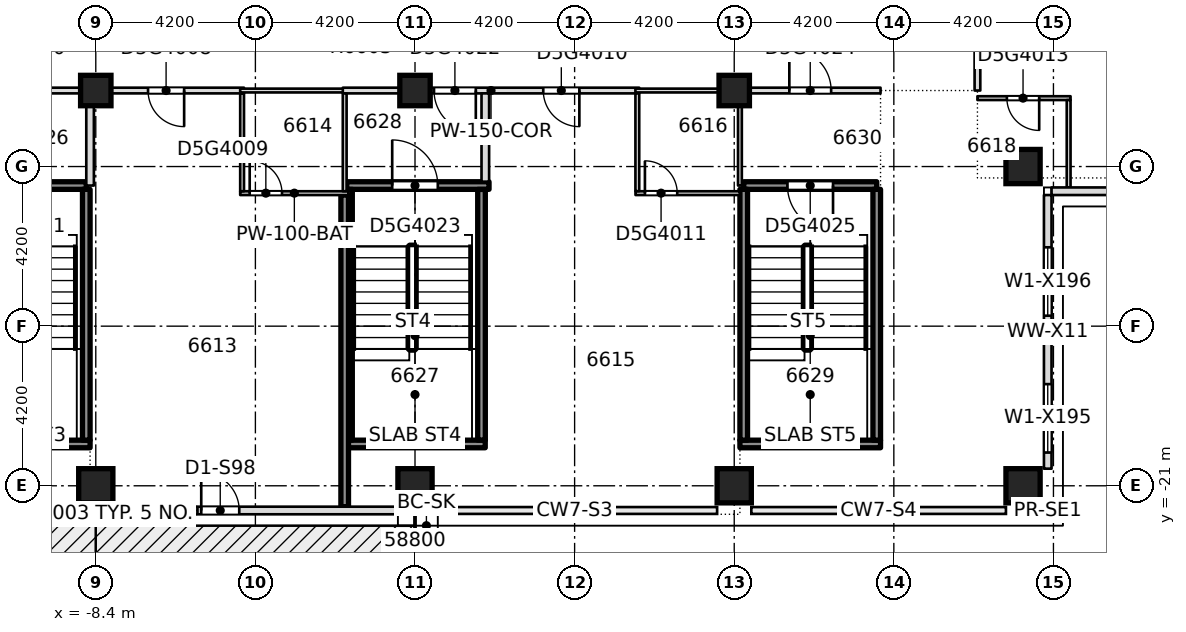
"""IFC4 building model, lengths in metres.
Left out: names, types, materials, properties, quantities, classifications, styles, units other than length and angle.
Written with IfcOpenShell. Run it as: python <this file> out.ifc"""

import sys

from ifc_helpers import new_model, si_unit, direction, frame, frame_2d, origin, origin_2d, place, context, subcontext, project, spatial, rectangle, extrude, element, fill, save


model = new_model("IFC4")
c1 = context("Model", 3, precision=1e-05, world=origin(), true_north=direction((0.0, 1.0)))
c2 = subcontext(c1, "Body", "Model", "MODEL_VIEW")
j1 = project(units=[si_unit("LENGTHUNIT", "METRE"), si_unit("PLANEANGLEUNIT", "RADIAN")], contexts=[c1])
p1 = place(None, origin())
s1 = spatial("IfcSite", under=j1, at=p1, CompositionType="ELEMENT")
p2 = place(p1, origin())
s2 = spatial("IfcBuilding", under=s1, at=p2, CompositionType="ELEMENT")
p3 = place(p2, frame((0.0, 0.0, 251.05)))
s3 = spatial("IfcBuildingStorey", under=s2, at=p3, CompositionType="ELEMENT", Elevation=251.05)
for number, where, z_axis, x_axis in (
    (1, (-8.4, -21.0, -0.4), (0.0, 0.0, 1.0), (1.0, 0.0, 0.0)),
    (2, (0.0, -21.0, -0.4), (0.0, 0.0, 1.0), (1.0, 0.0, 0.0)),
    (3, (8.4, -21.0, -0.4), (0.0, 0.0, 1.0), (1.0, 0.0, 0.0)),
    (4, (16.0, -21.0, -0.4), (0.0, 0.0, 1.0), (1.0, 0.0, 0.0)),
    (5, (16.0, -12.6, -0.4), (0.0, 0.0, 1.0), (1.0, 0.0, 0.0)),
):
    element("IfcColumn", number, at=place(p3, frame(where, z_axis=z_axis, x_axis=x_axis)), inside=s3, PredefinedType="COLUMN", context=c2, shape_type="SweptSolid", body=[
        extrude(rectangle(XDim=0.9, YDim=0.9, at=origin_2d()), origin(), (0.0, 0.0, 1.0), 3.45),
    ])
for number, where, z_axis, x_axis in (
    (6, (-8.4, -10.6, -0.4), (0.0, 0.0, 1.0), (1.0, 0.0, 0.0)),
    (7, (0.0, -10.6, -0.4), (0.0, 0.0, 1.0), (1.0, 0.0, 0.0)),
    (8, (8.4, -10.6, -0.4), (0.0, 0.0, 1.0), (1.0, 0.0, 0.0)),
):
    element("IfcColumn", number, at=place(p3, frame(where, z_axis=z_axis, x_axis=x_axis)), inside=s3, PredefinedType="COLUMN", context=c2, shape_type="SweptSolid", body=[
        extrude(rectangle(XDim=0.8, YDim=0.8, at=origin_2d()), origin(), (0.0, 0.0, 1.0), 3.45),
    ])
p4 = place(p3, frame((-1.848, -19.9, 0.0), z_axis=(0.0, 0.0, 1.0), x_axis=(1.0, 0.0, 0.0)))
e9 = element("IfcWall", 9, at=p4, inside=s3, PredefinedType="SOLIDWALL", context=c2, shape_type="SweptSolid", body=[
    extrude(rectangle(XDim=3.696, YDim=0.2, at=frame_2d((1.848, 0.0))), origin(), (0.0, 0.0, 1.0), 3.05),
])
p5 = place(p3, frame((-4.6, -13.3, 0.0), z_axis=(0.0, 0.0, 1.0), x_axis=(1.0, 0.0, 0.0)))
e10 = element("IfcWall", 10, at=p5, inside=s3, PredefinedType="PARTITIONING", context=c2, shape_type="SweptSolid", body=[
    extrude(rectangle(XDim=2.85, YDim=0.1, at=frame_2d((1.425, 0.0))), origin(), (0.0, 0.0, 1.0), 3.05),
])
p6 = place(p5, frame((0.25, 0.0, 0.0)))
e11 = element("IfcOpeningElement", 11, at=p6, cuts=e10, PredefinedType="OPENING", context=c2, shape_type="SweptSolid", body=[
    extrude(rectangle(XDim=0.85, YDim=2.1, at=frame_2d((0.425, 1.05))), frame((0.0, 0.06, 0.0), z_axis=(0.0, -1.0, 0.0), x_axis=(1.0, 0.0, 0.0)), (0.0, 0.0, 1.0), 0.12),
])
p7 = place(p3, frame((5.802, -13.3, 0.0), z_axis=(0.0, 0.0, 1.0), x_axis=(1.0, 0.0, 0.0)))
e12 = element("IfcWall", 12, at=p7, inside=s3, PredefinedType="PARTITIONING", context=c2, shape_type="SweptSolid", body=[
    extrude(rectangle(XDim=2.748, YDim=0.1, at=frame_2d((1.374, 0.0))), origin(), (0.0, 0.0, 1.0), 3.05),
])
p8 = place(p7, frame((0.248, 0.0, 0.0)))
e13 = element("IfcOpeningElement", 13, at=p8, cuts=e12, PredefinedType="OPENING", context=c2, shape_type="SweptSolid", body=[
    extrude(rectangle(XDim=0.85, YDim=2.1, at=frame_2d((0.425, 1.05))), frame((0.0, 0.06, 0.0), z_axis=(0.0, -1.0, 0.0), x_axis=(1.0, 0.0, 0.0)), (0.0, 0.0, 1.0), 0.12),
])
p9 = place(p3, frame((-12.15, -13.1, 0.0), z_axis=(0.0, 0.0, 1.0), x_axis=(1.0, 0.0, 0.0)))
e14 = element("IfcWall", 14, at=p9, inside=s3, PredefinedType="SOLIDWALL", context=c2, shape_type="SweptSolid", body=[
    extrude(rectangle(XDim=3.5, YDim=0.2, at=frame_2d((1.75, 0.0))), origin(), (0.0, 0.0, 1.0), 3.05),
])
p10 = place(p9, frame((1.15, 0.0, 0.0)))
e15 = element("IfcOpeningElement", 15, at=p10, cuts=e14, PredefinedType="OPENING", context=c2, shape_type="SweptSolid", body=[
    extrude(rectangle(XDim=1.2, YDim=2.1, at=frame_2d((0.6, 1.05))), frame((0.0, 0.11, 0.0), z_axis=(0.0, -1.0, 0.0), x_axis=(1.0, 0.0, 0.0)), (0.0, 0.0, 1.0), 0.22),
])
p11 = place(p3, frame((-1.798, -13.1, 0.0), z_axis=(0.0, 0.0, 1.0), x_axis=(1.0, 0.0, 0.0)))
e16 = element("IfcWall", 16, at=p11, inside=s3, PredefinedType="SOLIDWALL", context=c2, shape_type="SweptSolid", body=[
    extrude(rectangle(XDim=3.746, YDim=0.2, at=frame_2d((1.873, 0.0))), origin(), (0.0, 0.0, 1.0), 3.05),
])
p12 = place(p11, frame((1.198, 0.0, 0.0)))
e17 = element("IfcOpeningElement", 17, at=p12, cuts=e16, PredefinedType="OPENING", context=c2, shape_type="SweptSolid", body=[
    extrude(rectangle(XDim=1.2, YDim=2.1, at=frame_2d((0.6, 1.05))), frame((0.0, 0.11, 0.0), z_axis=(0.0, -1.0, 0.0), x_axis=(1.0, 0.0, 0.0)), (0.0, 0.0, 1.0), 0.22),
])
p13 = place(p3, frame((8.65, -13.1, 0.0), z_axis=(0.0, 0.0, 1.0), x_axis=(1.0, 0.0, 0.0)))
e18 = element("IfcWall", 18, at=p13, inside=s3, PredefinedType="SOLIDWALL", context=c2, shape_type="SweptSolid", body=[
    extrude(rectangle(XDim=3.5, YDim=0.2, at=frame_2d((1.75, 0.0))), origin(), (0.0, 0.0, 1.0), 3.05),
])
p14 = place(p13, frame((1.15, 0.0, 0.0)))
e19 = element("IfcOpeningElement", 19, at=p14, cuts=e18, PredefinedType="OPENING", context=c2, shape_type="SweptSolid", body=[
    extrude(rectangle(XDim=1.2, YDim=2.1, at=frame_2d((0.6, 1.05))), frame((0.0, 0.11, 0.0), z_axis=(0.0, -1.0, 0.0), x_axis=(1.0, 0.0, 0.0)), (0.0, 0.0, 1.0), 0.22),
])
p15 = place(p3, frame((14.8, -10.8, 0.0), z_axis=(0.0, 0.0, 1.0), x_axis=(1.0, 0.0, 0.0)))
e20 = element("IfcWall", 20, at=p15, inside=s3, PredefinedType="PARTITIONING", context=c2, shape_type="SweptSolid", body=[
    extrude(rectangle(XDim=2.45, YDim=0.1, at=frame_2d((1.225, 0.0))), origin(), (0.0, 0.0, 1.0), 3.05),
])
p16 = place(p15, frame((0.775, 0.0, 0.0)))
e21 = element("IfcOpeningElement", 21, at=p16, cuts=e20, PredefinedType="OPENING", context=c2, shape_type="SweptSolid", body=[
    extrude(rectangle(XDim=0.85, YDim=2.1, at=frame_2d((0.425, 1.05))), frame((0.0, 0.06, 0.0), z_axis=(0.0, -1.0, 0.0), x_axis=(1.0, 0.0, 0.0)), (0.0, 0.0, 1.0), 0.12),
])
p17 = place(p3, frame((-12.25, -10.6, 0.0), z_axis=(0.0, 0.0, 1.0), x_axis=(1.0, 0.0, 0.0)))
e22 = element("IfcWall", 22, at=p17, inside=s3, PredefinedType="PARTITIONING", context=c2, shape_type="SweptSolid", body=[
    extrude(rectangle(XDim=7.75, YDim=0.15, at=frame_2d((3.875, 0.0))), origin(), (0.0, 0.0, 1.0), 3.05),
])
p18 = place(p17, frame((5.225, 0.0, 0.0)))
e23 = element("IfcOpeningElement", 23, at=p18, cuts=e22, PredefinedType="OPENING", context=c2, shape_type="SweptSolid", body=[
    extrude(rectangle(XDim=0.95, YDim=2.1, at=frame_2d((0.475, 1.05))), frame((0.0, 0.085, 0.0), z_axis=(0.0, -1.0, 0.0), x_axis=(1.0, 0.0, 0.0)), (0.0, 0.0, 1.0), 0.17),
])
p19 = place(p17, frame((1.3, 0.0, 0.0)))
e24 = element("IfcOpeningElement", 24, at=p19, cuts=e22, PredefinedType="OPENING", context=c2, shape_type="SweptSolid", body=[
    extrude(rectangle(XDim=1.1, YDim=2.1, at=frame_2d((0.55, 1.05))), frame((0.0, 0.085, 0.0), z_axis=(0.0, -1.0, 0.0), x_axis=(1.0, 0.0, 0.0)), (0.0, 0.0, 1.0), 0.17),
])
p20 = place(p3, frame((-4.6, -10.6, 0.0), z_axis=(0.0, 0.0, 1.0), x_axis=(1.0, 0.0, 0.0)))
e25 = element("IfcWall", 25, at=p20, inside=s3, PredefinedType="PARTITIONING", context=c2, shape_type="SweptSolid", body=[
    extrude(rectangle(XDim=2.8, YDim=0.1, at=frame_2d((1.4, 0.0))), origin(), (0.0, 0.0, 1.0), 3.05),
])
p21 = place(p3, frame((-1.9, -10.6, 0.0), z_axis=(0.0, 0.0, 1.0), x_axis=(1.0, 0.0, 0.0)))
e26 = element("IfcWall", 26, at=p21, inside=s3, PredefinedType="PARTITIONING", context=c2, shape_type="SweptSolid", body=[
    extrude(rectangle(XDim=7.8, YDim=0.15, at=frame_2d((3.9, 0.0))), origin(), (0.0, 0.0, 1.0), 3.05),
])
p22 = place(p21, frame((5.275, 0.0, 0.0)))
e27 = element("IfcOpeningElement", 27, at=p22, cuts=e26, PredefinedType="OPENING", context=c2, shape_type="SweptSolid", body=[
    extrude(rectangle(XDim=0.95, YDim=2.1, at=frame_2d((0.475, 1.05))), frame((0.0, 0.085, 0.0), z_axis=(0.0, -1.0, 0.0), x_axis=(1.0, 0.0, 0.0)), (0.0, 0.0, 1.0), 0.17),
])
p23 = place(p21, frame((2.4, 0.0, 0.0)))
e28 = element("IfcOpeningElement", 28, at=p23, cuts=e26, PredefinedType="OPENING", context=c2, shape_type="SweptSolid", body=[
    extrude(rectangle(XDim=1.1, YDim=2.1, at=frame_2d((0.55, 1.05))), frame((0.0, 0.085, 0.0), z_axis=(0.0, -1.0, 0.0), x_axis=(1.0, 0.0, 0.0)), (0.0, 0.0, 1.0), 0.17),
])
p24 = place(p3, frame((5.8, -10.6, 0.0), z_axis=(0.0, 0.0, 1.0), x_axis=(1.0, 0.0, 0.0)))
e29 = element("IfcWall", 29, at=p24, inside=s3, PredefinedType="PARTITIONING", context=c2, shape_type="SweptSolid", body=[
    extrude(rectangle(XDim=2.8, YDim=0.1, at=frame_2d((1.4, 0.0))), origin(), (0.0, 0.0, 1.0), 3.05),
])
p25 = place(p3, frame((8.5, -10.6, 0.0), z_axis=(0.0, 0.0, 1.0), x_axis=(1.0, 0.0, 0.0)))
e30 = element("IfcWall", 30, at=p25, inside=s3, PredefinedType="PARTITIONING", context=c2, shape_type="SweptSolid", body=[
    extrude(rectangle(XDim=3.75, YDim=0.15, at=frame_2d((1.875, 0.0))), origin(), (0.0, 0.0, 1.0), 3.05),
])
p26 = place(p25, frame((1.35, 0.0, 0.0)))
e31 = element("IfcOpeningElement", 31, at=p26, cuts=e30, PredefinedType="OPENING", context=c2, shape_type="SweptSolid", body=[
    extrude(rectangle(XDim=1.1, YDim=2.1, at=frame_2d((0.55, 1.05))), frame((0.0, 0.085, 0.0), z_axis=(0.0, -1.0, 0.0), x_axis=(1.0, 0.0, 0.0)), (0.0, 0.0, 1.0), 0.17),
])
p27 = place(p3, frame((-8.55, -13.1, 0.0), z_axis=(0.0, 0.0, 1.0), x_axis=(0.0, 1.0, 0.0)))
e32 = element("IfcWall", 32, at=p27, inside=s3, PredefinedType="PARTITIONING", context=c2, shape_type="SweptSolid", body=[
    extrude(rectangle(XDim=2.425, YDim=0.2, at=frame_2d((1.212, 0.0))), origin(), (0.0, 0.0, 1.0), 3.05),
])
for number, where, z_axis, x_axis in (
    (33, (-4.55, -13.25, 0.0), (0.0, 0.0, 1.0), (0.0, 1.0, 0.0)),
    (34, (-1.85, -13.25, 0.0), (0.0, 0.0, 1.0), (0.0, 1.0, 0.0)),
):
    element("IfcWall", number, at=place(p3, frame(where, z_axis=z_axis, x_axis=x_axis)), inside=s3, PredefinedType="PARTITIONING", context=c2, shape_type="SweptSolid", body=[
        extrude(rectangle(XDim=2.575, YDim=0.1, at=frame_2d((1.288, 0.0))), origin(), (0.0, 0.0, 1.0), 3.05),
    ])
for number, where, z_axis, x_axis in (
    (35, (-1.75, -19.798, 0.0), (0.0, 0.0, 1.0), (0.0, 1.0, 0.0)),
    (36, (1.75, -19.798, 0.0), (0.0, 0.0, 1.0), (0.0, 1.0, 0.0)),
):
    element("IfcWall", number, at=place(p3, frame(where, z_axis=z_axis, x_axis=x_axis)), inside=s3, PredefinedType="SOLIDWALL", context=c2, shape_type="SweptSolid", body=[
        extrude(rectangle(XDim=6.596, YDim=0.2, at=frame_2d((3.298, 0.0))), origin(), (0.0, 0.0, 1.0), 3.05),
    ])
p28 = place(p3, frame((1.85, -12.998, 0.0), z_axis=(0.0, 0.0, 1.0), x_axis=(0.0, 1.0, 0.0)))
e37 = element("IfcWall", 37, at=p28, inside=s3, PredefinedType="PARTITIONING", context=c2, shape_type="SweptSolid", body=[
    extrude(rectangle(XDim=2.323, YDim=0.2, at=frame_2d((1.162, 0.0))), origin(), (0.0, 0.0, 1.0), 3.05),
])
p29 = place(p3, frame((5.85, -13.248, 0.0), z_axis=(0.0, 0.0, 1.0), x_axis=(0.0, 1.0, 0.0)))
e38 = element("IfcWall", 38, at=p29, inside=s3, PredefinedType="PARTITIONING", context=c2, shape_type="SweptSolid", body=[
    extrude(rectangle(XDim=2.573, YDim=0.1, at=frame_2d((1.287, 0.0))), origin(), (0.0, 0.0, 1.0), 3.05),
])
p30 = place(p3, frame((8.55, -13.1, 0.0), z_axis=(0.0, 0.0, 1.0), x_axis=(0.0, 1.0, 0.0)))
e39 = element("IfcWall", 39, at=p30, inside=s3, PredefinedType="PARTITIONING", context=c2, shape_type="SweptSolid", body=[
    extrude(rectangle(XDim=2.425, YDim=0.1, at=frame_2d((1.212, 0.0))), origin(), (0.0, 0.0, 1.0), 3.05),
])
p31 = place(p3, frame((14.8, -10.6, 0.0), z_axis=(0.0, 0.0, 1.0), x_axis=(0.0, 1.0, 0.0)))
e40 = element("IfcWall", 40, at=p31, inside=s3, PredefinedType="PARTITIONING", context=c2, shape_type="SweptSolid", body=[
    extrude(rectangle(XDim=3.125, YDim=0.15, at=frame_2d((1.562, 0.0))), origin(), (0.0, 0.0, 1.0), 3.05),
])
p32 = place(p3, frame((17.2, -13.15, 0.0), z_axis=(0.0, 0.0, 1.0), x_axis=(0.0, 1.0, 0.0)))
e41 = element("IfcWall", 41, at=p32, inside=s3, PredefinedType="PARTITIONING", context=c2, shape_type="SweptSolid", body=[
    extrude(rectangle(XDim=2.3, YDim=0.1, at=frame_2d((1.15, 0.0))), origin(), (0.0, 0.0, 1.0), 3.05),
])
p33 = place(p3, frame((-15.55, -21.65, 0.0), z_axis=(0.0, 0.0, 1.0), x_axis=(1.0, 0.0, 0.0)))
e42 = element("IfcWall", 42, at=p33, inside=s3, PredefinedType="STANDARD", context=c2, shape_type="SweptSolid", body=[
    extrude(rectangle(XDim=6.7, YDim=0.2, at=frame_2d((3.35, 0.0))), origin(), (0.0, 0.0, 1.0), 3.05),
])
p34 = place(p33, frame((0.975, 0.0, 0.0)))
e43 = element("IfcOpeningElement", 43, at=p34, cuts=e42, PredefinedType="OPENING", context=c2, shape_type="SweptSolid", body=[
    extrude(rectangle(XDim=1.0, YDim=2.4, at=frame_2d((0.5, 1.2))), frame((0.0, 0.11, 0.0), z_axis=(0.0, -1.0, 0.0), x_axis=(1.0, 0.0, 0.0)), (0.0, 0.0, 1.0), 0.22),
])
p35 = place(p3, frame((-7.95, -21.65, 0.0), z_axis=(0.0, 0.0, 1.0), x_axis=(1.0, 0.0, 0.0)))
e44 = element("IfcWall", 44, at=p35, inside=s3, PredefinedType="STANDARD", context=c2, shape_type="SweptSolid", body=[
    extrude(rectangle(XDim=7.5, YDim=0.2, at=frame_2d((3.75, 0.0))), origin(), (0.0, 0.0, 1.0), 3.05),
])
p36 = place(p35, frame((0.425, 0.0, 0.2)))
e45 = element("IfcOpeningElement", 45, at=p36, cuts=e44, PredefinedType="OPENING", context=c2, shape_type="SweptSolid", body=[
    extrude(rectangle(XDim=1.8, YDim=2.65, at=frame_2d((0.9, 1.325))), frame((0.0, 0.11, 0.0), z_axis=(0.0, -1.0, 0.0), x_axis=(1.0, 0.0, 0.0)), (0.0, 0.0, 1.0), 0.22),
])
p37 = place(p35, frame((2.325, 0.0, 0.0)))
e46 = element("IfcOpeningElement", 46, at=p37, cuts=e44, PredefinedType="OPENING", context=c2, shape_type="SweptSolid", body=[
    extrude(rectangle(XDim=1.0, YDim=2.4, at=frame_2d((0.5, 1.2))), frame((0.0, 0.11, 0.0), z_axis=(0.0, -1.0, 0.0), x_axis=(1.0, 0.0, 0.0)), (0.0, 0.0, 1.0), 0.22),
])
p38 = place(p3, frame((16.65, -20.55, 0.0), z_axis=(0.0, 0.0, 1.0), x_axis=(0.0, 1.0, 0.0)))
e47 = element("IfcWall", 47, at=p38, inside=s3, PredefinedType="STANDARD", context=c2, shape_type="SweptSolid", body=[
    extrude(rectangle(XDim=7.2, YDim=0.2, at=frame_2d((3.6, 0.0))), origin(), (0.0, 0.0, 1.0), 3.05),
])
p39 = place(p38, frame((0.425, 0.0, 0.2)))
e48 = element("IfcOpeningElement", 48, at=p39, cuts=e47, PredefinedType="OPENING", context=c2, shape_type="SweptSolid", body=[
    extrude(rectangle(XDim=1.8, YDim=2.65, at=frame_2d((0.9, 1.325))), frame((0.0, 0.11, 0.0), z_axis=(0.0, -1.0, 0.0), x_axis=(1.0, 0.0, 0.0)), (0.0, 0.0, 1.0), 0.22),
])
p40 = place(p38, frame((4.025, 0.0, 0.2)))
e49 = element("IfcOpeningElement", 49, at=p40, cuts=e47, PredefinedType="OPENING", context=c2, shape_type="SweptSolid", body=[
    extrude(rectangle(XDim=1.8, YDim=2.65, at=frame_2d((0.9, 1.325))), frame((0.0, 0.11, 0.0), z_axis=(0.0, -1.0, 0.0), x_axis=(1.0, 0.0, 0.0)), (0.0, 0.0, 1.0), 0.22),
])
p41 = place(p3, frame((16.75, -13.25, 0.0), z_axis=(0.0, 0.0, 1.0), x_axis=(1.0, 0.0, 0.0)))
e50 = element("IfcWall", 50, at=p41, inside=s3, PredefinedType="STANDARD", context=c2, shape_type="SweptSolid", body=[
    extrude(rectangle(XDim=8.0, YDim=0.2, at=frame_2d((4.0, 0.0))), origin(), (0.0, 0.0, 1.0), 3.05),
])
p42 = place(p3, frame((-12.25, -19.9, 0.0), z_axis=(0.0, 0.0, 1.0), x_axis=(1.0, 0.0, 0.0)))
e51 = element("IfcWall", 51, at=p42, inside=s3, PredefinedType="SOLIDWALL", context=c2, shape_type="SweptSolid", body=[
    extrude(rectangle(XDim=3.7, YDim=0.2, at=frame_2d((1.85, 0.0))), origin(), (0.0, 0.0, 1.0), 3.05),
])
p43 = place(p3, frame((-8.65, -19.8, 0.0), z_axis=(0.0, 0.0, 1.0), x_axis=(0.0, 1.0, 0.0)))
e52 = element("IfcWall", 52, at=p43, inside=s3, PredefinedType="SOLIDWALL", context=c2, shape_type="SweptSolid", body=[
    extrude(rectangle(XDim=6.6, YDim=0.2, at=frame_2d((3.3, 0.0))), origin(), (0.0, 0.0, 1.0), 3.05),
])
p44 = place(p3, frame((8.55, -19.9, 0.0), z_axis=(0.0, 0.0, 1.0), x_axis=(1.0, 0.0, 0.0)))
e53 = element("IfcWall", 53, at=p44, inside=s3, PredefinedType="SOLIDWALL", context=c2, shape_type="SweptSolid", body=[
    extrude(rectangle(XDim=3.7, YDim=0.2, at=frame_2d((1.85, 0.0))), origin(), (0.0, 0.0, 1.0), 3.05),
])
for number, where, z_axis, x_axis in (
    (54, (8.65, -19.8, 0.0), (0.0, 0.0, 1.0), (0.0, 1.0, 0.0)),
    (55, (12.15, -19.8, 0.0), (0.0, 0.0, 1.0), (0.0, 1.0, 0.0)),
):
    element("IfcWall", number, at=place(p3, frame(where, z_axis=z_axis, x_axis=x_axis)), inside=s3, PredefinedType="SOLIDWALL", context=c2, shape_type="SweptSolid", body=[
        extrude(rectangle(XDim=6.6, YDim=0.2, at=frame_2d((3.3, 0.0))), origin(), (0.0, 0.0, 1.0), 3.05),
    ])
p45 = place(p3, frame((-1.85, -21.55, 0.0), z_axis=(0.0, 0.0, 1.0), x_axis=(0.0, 1.0, 0.0)))
e56 = element("IfcWall", 56, at=p45, inside=s3, PredefinedType="SOLIDWALL", context=c2, shape_type="SweptSolid", body=[
    extrude(rectangle(XDim=8.2, YDim=0.2, at=frame_2d((4.1, 0.0))), origin(), (0.0, 0.0, 1.0), 3.05),
])
p46 = place(p18, origin())
e57 = element("IfcDoor", 57, at=p46, inside=s3, OperationType="SINGLE_SWING_LEFT", PredefinedType="DOOR", context=c2, shape_type="SweptSolid", body=[
    extrude(rectangle(XDim=0.95, YDim=2.1, at=frame_2d((0.475, 1.05))), frame((0.0, 0.025, 0.0), z_axis=(0.0, -1.0, 0.0), x_axis=(1.0, 0.0, 0.0)), (0.0, 0.0, 1.0), 0.05),
])
fill(e23, e57)
p47 = place(p6, origin())
e58 = element("IfcDoor", 58, at=p47, inside=s3, OperationType="SINGLE_SWING_LEFT", PredefinedType="DOOR", context=c2, shape_type="SweptSolid", body=[
    extrude(rectangle(XDim=0.85, YDim=2.1, at=frame_2d((0.425, 1.05))), frame((0.0, 0.025, 0.0), z_axis=(0.0, -1.0, 0.0), x_axis=(1.0, 0.0, 0.0)), (0.0, 0.0, 1.0), 0.05),
])
fill(e11, e58)
p48 = place(p22, origin())
e59 = element("IfcDoor", 59, at=p48, inside=s3, OperationType="SINGLE_SWING_LEFT", PredefinedType="DOOR", context=c2, shape_type="SweptSolid", body=[
    extrude(rectangle(XDim=0.95, YDim=2.1, at=frame_2d((0.475, 1.05))), frame((0.0, 0.025, 0.0), z_axis=(0.0, -1.0, 0.0), x_axis=(1.0, 0.0, 0.0)), (0.0, 0.0, 1.0), 0.05),
])
fill(e27, e59)
p49 = place(p8, origin())
e60 = element("IfcDoor", 60, at=p49, inside=s3, OperationType="SINGLE_SWING_LEFT", PredefinedType="DOOR", context=c2, shape_type="SweptSolid", body=[
    extrude(rectangle(XDim=0.85, YDim=2.1, at=frame_2d((0.425, 1.05))), frame((0.0, 0.025, 0.0), z_axis=(0.0, -1.0, 0.0), x_axis=(1.0, 0.0, 0.0)), (0.0, 0.0, 1.0), 0.05),
])
fill(e13, e60)
p50 = place(p16, origin())
e61 = element("IfcDoor", 61, at=p50, inside=s3, OperationType="SINGLE_SWING_RIGHT", PredefinedType="DOOR", context=c2, shape_type="SweptSolid", body=[
    extrude(rectangle(XDim=0.85, YDim=2.1, at=frame_2d((0.425, 1.05))), frame((0.0, 0.025, 0.0), z_axis=(0.0, -1.0, 0.0), x_axis=(1.0, 0.0, 0.0)), (0.0, 0.0, 1.0), 0.05),
])
fill(e21, e61)
p51 = place(p23, origin())
e62 = element("IfcDoor", 62, at=p51, inside=s3, OperationType="SINGLE_SWING_LEFT", PredefinedType="DOOR", context=c2, shape_type="SweptSolid", body=[
    extrude(rectangle(XDim=1.1, YDim=2.1, at=frame_2d((0.55, 1.05))), frame((0.0, 0.025, 0.0), z_axis=(0.0, -1.0, 0.0), x_axis=(1.0, 0.0, 0.0)), (0.0, 0.0, 1.0), 0.05),
])
fill(e28, e62)
p52 = place(p12, origin())
e63 = element("IfcDoor", 63, at=p52, inside=s3, OperationType="SINGLE_SWING_RIGHT", PredefinedType="DOOR", context=c2, shape_type="SweptSolid", body=[
    extrude(rectangle(XDim=1.2, YDim=2.1, at=frame_2d((0.6, 1.05))), frame((0.0, 0.025, 0.0), z_axis=(0.0, -1.0, 0.0), x_axis=(1.0, 0.0, 0.0)), (0.0, 0.0, 1.0), 0.05),
])
fill(e17, e63)
p53 = place(p26, origin())
e64 = element("IfcDoor", 64, at=p53, inside=s3, OperationType="SINGLE_SWING_RIGHT", PredefinedType="DOOR", context=c2, shape_type="SweptSolid", body=[
    extrude(rectangle(XDim=1.1, YDim=2.1, at=frame_2d((0.55, 1.05))), frame((0.0, 0.025, 0.0), z_axis=(0.0, -1.0, 0.0), x_axis=(1.0, 0.0, 0.0)), (0.0, 0.0, 1.0), 0.05),
])
fill(e31, e64)
p54 = place(p14, origin())
e65 = element("IfcDoor", 65, at=p54, inside=s3, OperationType="SINGLE_SWING_RIGHT", PredefinedType="DOOR", context=c2, shape_type="SweptSolid", body=[
    extrude(rectangle(XDim=1.2, YDim=2.1, at=frame_2d((0.6, 1.05))), frame((0.0, 0.025, 0.0), z_axis=(0.0, -1.0, 0.0), x_axis=(1.0, 0.0, 0.0)), (0.0, 0.0, 1.0), 0.05),
])
fill(e19, e65)
p55 = place(p36, origin())
e66 = element("IfcWindow", 66, at=p55, inside=s3, PartitioningType="SINGLE_PANEL", PredefinedType="WINDOW", context=c2, shape_type="SweptSolid", body=[
    extrude(rectangle(XDim=1.8, YDim=2.65, at=frame_2d((0.9, 1.325))), frame((0.0, 0.03, 0.0), z_axis=(0.0, -1.0, 0.0), x_axis=(1.0, 0.0, 0.0)), (0.0, 0.0, 1.0), 0.06),
])
fill(e45, e66)
p56 = place(p37, origin())
e67 = element("IfcDoor", 67, at=p56, inside=s3, OperationType="SINGLE_SWING_LEFT", PredefinedType="DOOR", context=c2, shape_type="SweptSolid", body=[
    extrude(rectangle(XDim=1.0, YDim=2.4, at=frame_2d((0.5, 1.2))), frame((0.0, 0.025, 0.0), z_axis=(0.0, -1.0, 0.0), x_axis=(1.0, 0.0, 0.0)), (0.0, 0.0, 1.0), 0.05),
])
fill(e46, e67)
p57 = place(p39, origin())
e68 = element("IfcWindow", 68, at=p57, inside=s3, PartitioningType="SINGLE_PANEL", PredefinedType="WINDOW", context=c2, shape_type="SweptSolid", body=[
    extrude(rectangle(XDim=1.8, YDim=2.65, at=frame_2d((0.9, 1.325))), frame((0.0, 0.03, 0.0), z_axis=(0.0, -1.0, 0.0), x_axis=(1.0, 0.0, 0.0)), (0.0, 0.0, 1.0), 0.06),
])
fill(e48, e68)
p58 = place(p40, origin())
e69 = element("IfcWindow", 69, at=p58, inside=s3, PartitioningType="SINGLE_PANEL", PredefinedType="WINDOW", context=c2, shape_type="SweptSolid", body=[
    extrude(rectangle(XDim=1.8, YDim=2.65, at=frame_2d((0.9, 1.325))), frame((0.0, 0.03, 0.0), z_axis=(0.0, -1.0, 0.0), x_axis=(1.0, 0.0, 0.0)), (0.0, 0.0, 1.0), 0.06),
])
fill(e49, e69)
save(model, sys.argv[1])
